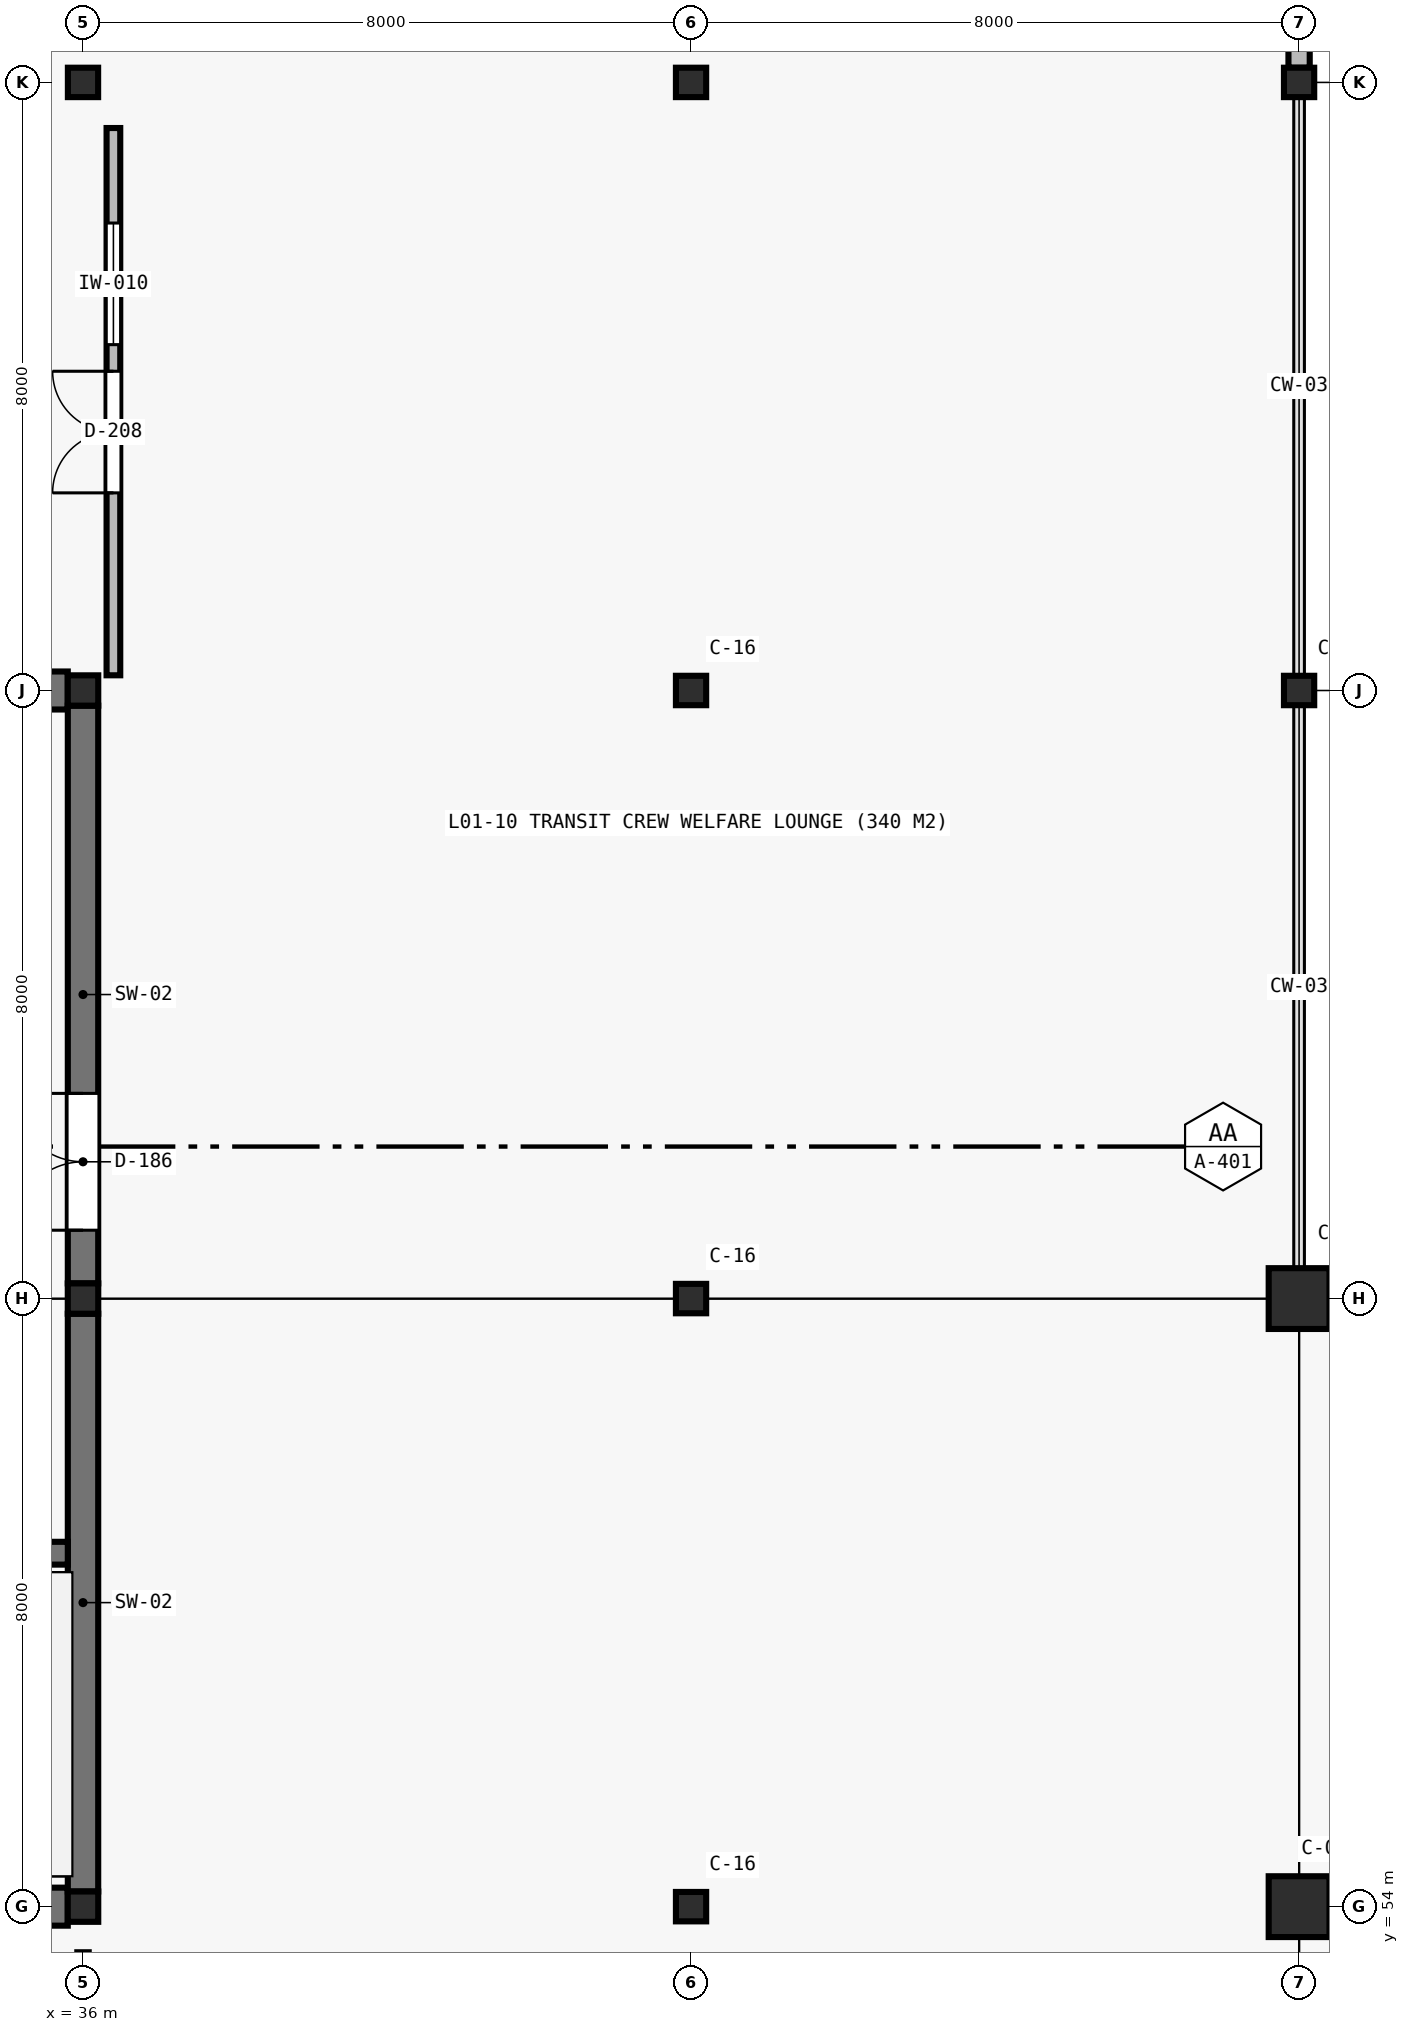
"""IFC4 building model, lengths in metres.
Left out: names, types, materials, properties, quantities, classifications, styles, units other than length and angle.
Written with IfcOpenShell. Run it as: python <this file> out.ifc"""

import sys

from ifc_helpers import new_model, si_unit, direction, frame, frame_2d, origin, origin_2d, place, context, subcontext, project, spatial, rectangle, i_section, extrude, element, fill, save


model = new_model("IFC4")
c1 = context("Model", 3, precision=1e-05, world=origin(), true_north=direction((0.0, 1.0)))
c2 = subcontext(c1, "Body", "Model", "MODEL_VIEW")
j1 = project(units=[si_unit("LENGTHUNIT", "METRE"), si_unit("PLANEANGLEUNIT", "RADIAN")], contexts=[c1])
p1 = place(None, origin())
s1 = spatial("IfcSite", under=j1, at=p1, CompositionType="ELEMENT")
p2 = place(p1, origin())
s2 = spatial("IfcBuilding", under=s1, at=p2, CompositionType="ELEMENT")
p3 = place(p2, frame((0.0, 0.0, 6.3)))
s3 = spatial("IfcBuildingStorey", under=s2, at=p3, CompositionType="ELEMENT", Elevation=6.3)
for number, where, z_axis, x_axis in (
    (1, (36.0, 54.0, 0.0), (0.0, 0.0, 1.0), (1.0, 0.0, 0.0)),
    (2, (36.0, 62.0, 0.0), (0.0, 0.0, 1.0), (1.0, 0.0, 0.0)),
    (3, (36.0, 70.0, 0.0), (0.0, 0.0, 1.0), (1.0, 0.0, 0.0)),
):
    element("IfcColumn", number, at=place(p3, frame(where, z_axis=z_axis, x_axis=x_axis)), inside=s3, PredefinedType="COLUMN", context=c2, shape_type="SweptSolid", body=[
        extrude(i_section(OverallWidth=0.401, OverallDepth=0.399, WebThickness=0.025, FlangeThickness=0.04, at=origin_2d()), origin(), (0.0, 0.0, 1.0), 4.6),
    ])
for number, where, z_axis, x_axis in (
    (4, (36.0, 78.0, 0.0), (0.0, 0.0, 1.0), (1.0, 0.0, 0.0)),
    (5, (44.0, 54.0, 0.0), (0.0, 0.0, 1.0), (1.0, 0.0, 0.0)),
    (6, (44.0, 62.0, 0.0), (0.0, 0.0, 1.0), (1.0, 0.0, 0.0)),
    (7, (44.0, 70.0, 0.0), (0.0, 0.0, 1.0), (1.0, 0.0, 0.0)),
    (8, (44.0, 78.0, 0.0), (0.0, 0.0, 1.0), (1.0, 0.0, 0.0)),
):
    element("IfcColumn", number, at=place(p3, frame(where, z_axis=z_axis, x_axis=x_axis)), inside=s3, PredefinedType="COLUMN", context=c2, shape_type="SweptSolid", body=[
        extrude(i_section(OverallWidth=0.398, OverallDepth=0.387, WebThickness=0.021, FlangeThickness=0.033, at=origin_2d()), origin(), (0.0, 0.0, 1.0), 4.6),
    ])
for number, where, z_axis, x_axis in (
    (9, (52.0, 54.0, 0.0), (0.0, 0.0, 1.0), (1.0, 0.0, 0.0)),
    (10, (52.0, 62.0, 0.0), (0.0, 0.0, 1.0), (1.0, 0.0, 0.0)),
):
    element("IfcColumn", number, at=place(p3, frame(where, z_axis=z_axis, x_axis=x_axis)), inside=s3, PredefinedType="COLUMN", context=c2, shape_type="SweptSolid", body=[
        extrude(rectangle(XDim=0.8, YDim=0.8, at=origin_2d()), origin(), (0.0, 0.0, 1.0), 4.6),
    ])
for number, where, z_axis, x_axis in (
    (11, (52.0, 70.0, 0.0), (0.0, 0.0, 1.0), (1.0, 0.0, 0.0)),
    (12, (52.0, 78.0, 0.0), (0.0, 0.0, 1.0), (1.0, 0.0, 0.0)),
):
    element("IfcColumn", number, at=place(p3, frame(where, z_axis=z_axis, x_axis=x_axis)), inside=s3, PredefinedType="COLUMN", context=c2, shape_type="SweptSolid", body=[
        extrude(i_section(OverallWidth=0.398, OverallDepth=0.387, WebThickness=0.021, FlangeThickness=0.033, at=origin_2d()), origin(), (0.0, 0.0, 1.0), 4.6),
    ])
for number, where, z_axis, x_axis in (
    (13, (28.0, 54.0, 0.0), (0.0, 0.0, 1.0), (1.0, 0.0, 0.0)),
    (14, (28.0, 70.0, 0.0), (0.0, 0.0, 1.0), (1.0, 0.0, 0.0)),
):
    element("IfcWall", number, at=place(p3, frame(where, z_axis=z_axis, x_axis=x_axis)), inside=s3, PredefinedType="SHEAR", context=c2, shape_type="SweptSolid", body=[
        extrude(rectangle(XDim=7.8, YDim=0.5, at=frame_2d((3.9, 0.0))), origin(), (0.0, 0.0, 1.0), 4.6),
    ])
p4 = place(p3, frame((36.0, 54.199, 0.0), z_axis=(0.0, 0.0, 1.0), x_axis=(0.0, 1.0, 0.0)))
e15 = element("IfcWall", 15, at=p4, inside=s3, PredefinedType="SHEAR", context=c2, shape_type="SweptSolid", body=[
    extrude(rectangle(XDim=7.601, YDim=0.4, at=frame_2d((3.801, 0.0))), origin(), (0.0, 0.0, 1.0), 4.6),
])
p5 = place(p3, frame((36.0, 62.199, 0.0), z_axis=(0.0, 0.0, 1.0), x_axis=(0.0, 1.0, 0.0)))
e16 = element("IfcWall", 16, at=p5, inside=s3, PredefinedType="SHEAR", context=c2, shape_type="SweptSolid", body=[
    extrude(rectangle(XDim=7.601, YDim=0.4, at=frame_2d((3.801, 0.0))), origin(), (0.0, 0.0, 1.0), 4.6),
])
p6 = place(p5, frame((0.7, 0.0, 0.0)))
e17 = element("IfcOpeningElement", 17, at=p6, cuts=e16, PredefinedType="OPENING", context=c2, shape_type="SweptSolid", body=[
    extrude(rectangle(XDim=1.8, YDim=2.2, at=frame_2d((0.9, 1.1))), frame((0.0, 0.21, 0.0), z_axis=(0.0, -1.0, 0.0), x_axis=(1.0, 0.0, 0.0)), (0.0, 0.0, 1.0), 0.42),
])
p7 = place(p3, frame((26.05, 58.65, 0.0), z_axis=(0.0, 0.0, 1.0), x_axis=(1.0, 0.0, 0.0)))
e18 = element("IfcWall", 18, at=p7, inside=s3, PredefinedType="SHEAR", context=c2, shape_type="SweptSolid", body=[
    extrude(rectangle(XDim=9.75, YDim=0.3, at=frame_2d((4.875, 0.0))), origin(), (0.0, 0.0, 1.0), 4.6),
])
p8 = place(p7, frame((0.55, 0.0, 0.0)))
e19 = element("IfcOpeningElement", 19, at=p8, cuts=e18, PredefinedType="OPENING", context=c2, shape_type="SweptSolid", body=[
    extrude(rectangle(XDim=1.2, YDim=2.2, at=frame_2d((0.6, 1.1))), frame((0.0, 0.16, 0.0), z_axis=(0.0, -1.0, 0.0), x_axis=(1.0, 0.0, 0.0)), (0.0, 0.0, 1.0), 0.32),
])
p9 = place(p3, frame((52.0, 85.806, 0.0), z_axis=(0.0, 0.0, 1.0), x_axis=(0.0, -1.0, 0.0)))
e20 = element("IfcWall", 20, at=p9, inside=s3, PredefinedType="STANDARD", context=c2, shape_type="SweptSolid", body=[
    extrude(rectangle(XDim=7.613, YDim=0.28, at=frame_2d((3.806, 0.0))), origin(), (0.0, 0.0, 1.0), 3.85),
])
p10 = place(p9, frame((3.056, 0.0, 0.95)))
e21 = element("IfcOpeningElement", 21, at=p10, cuts=e20, PredefinedType="OPENING", context=c2, shape_type="SweptSolid", body=[
    extrude(rectangle(XDim=1.5, YDim=2.0, at=frame_2d((0.75, 1.0))), frame((0.0, 0.15, 0.0), z_axis=(0.0, -1.0, 0.0), x_axis=(1.0, 0.0, 0.0)), (0.0, 0.0, 1.0), 0.3),
])
p11 = place(p3, frame((36.4, 70.2, 0.0), z_axis=(0.0, 0.0, 1.0), x_axis=(0.0, 1.0, 0.0)))
e22 = element("IfcWall", 22, at=p11, inside=s3, PredefinedType="PARTITIONING", context=c2, shape_type="SweptSolid", body=[
    extrude(rectangle(XDim=7.2, YDim=0.18, at=frame_2d((3.6, 0.0))), origin(), (0.0, 0.0, 1.0), 4.6),
])
p12 = place(p11, frame((2.4, 0.0, 0.0)))
e23 = element("IfcOpeningElement", 23, at=p12, cuts=e22, PredefinedType="OPENING", context=c2, shape_type="SweptSolid", body=[
    extrude(rectangle(XDim=1.6, YDim=2.2, at=frame_2d((0.8, 1.1))), frame((0.0, 0.1, 0.0), z_axis=(0.0, -1.0, 0.0), x_axis=(1.0, 0.0, 0.0)), (0.0, 0.0, 1.0), 0.2),
])
p13 = place(p11, frame((4.35, 0.0, 0.95)))
e24 = element("IfcOpeningElement", 24, at=p13, cuts=e22, PredefinedType="OPENING", context=c2, shape_type="SweptSolid", body=[
    extrude(rectangle(XDim=1.6, YDim=1.3, at=frame_2d((0.8, 0.65))), frame((0.0, 0.1, 0.0), z_axis=(0.0, -1.0, 0.0), x_axis=(1.0, 0.0, 0.0)), (0.0, 0.0, 1.0), 0.2),
])
p14 = place(p6, origin())
e25 = element("IfcDoor", 25, at=p14, inside=s3, OperationType="DOUBLE_DOOR_SINGLE_SWING", PredefinedType="DOOR", context=c2, shape_type="SweptSolid", body=[
    extrude(rectangle(XDim=1.8, YDim=2.2, at=frame_2d((0.9, 1.1))), frame((0.0, 0.025, 0.0), z_axis=(0.0, -1.0, 0.0), x_axis=(1.0, 0.0, 0.0)), (0.0, 0.0, 1.0), 0.05),
])
fill(e17, e25)
p15 = place(p12, origin())
e26 = element("IfcDoor", 26, at=p15, inside=s3, OperationType="DOUBLE_DOOR_SINGLE_SWING", PredefinedType="DOOR", context=c2, shape_type="SweptSolid", body=[
    extrude(rectangle(XDim=1.6, YDim=2.2, at=frame_2d((0.8, 1.1))), frame((0.0, 0.025, 0.0), z_axis=(0.0, -1.0, 0.0), x_axis=(1.0, 0.0, 0.0)), (0.0, 0.0, 1.0), 0.05),
])
fill(e23, e26)
p16 = place(p13, origin())
e27 = element("IfcWindow", 27, at=p16, inside=s3, PartitioningType="SINGLE_PANEL", PredefinedType="WINDOW", context=c2, shape_type="SweptSolid", body=[
    extrude(rectangle(XDim=1.6, YDim=1.3, at=frame_2d((0.8, 0.65))), frame((0.0, 0.03, 0.0), z_axis=(0.0, -1.0, 0.0), x_axis=(1.0, 0.0, 0.0)), (0.0, 0.0, 1.0), 0.06),
])
fill(e24, e27)
save(model, sys.argv[1])
